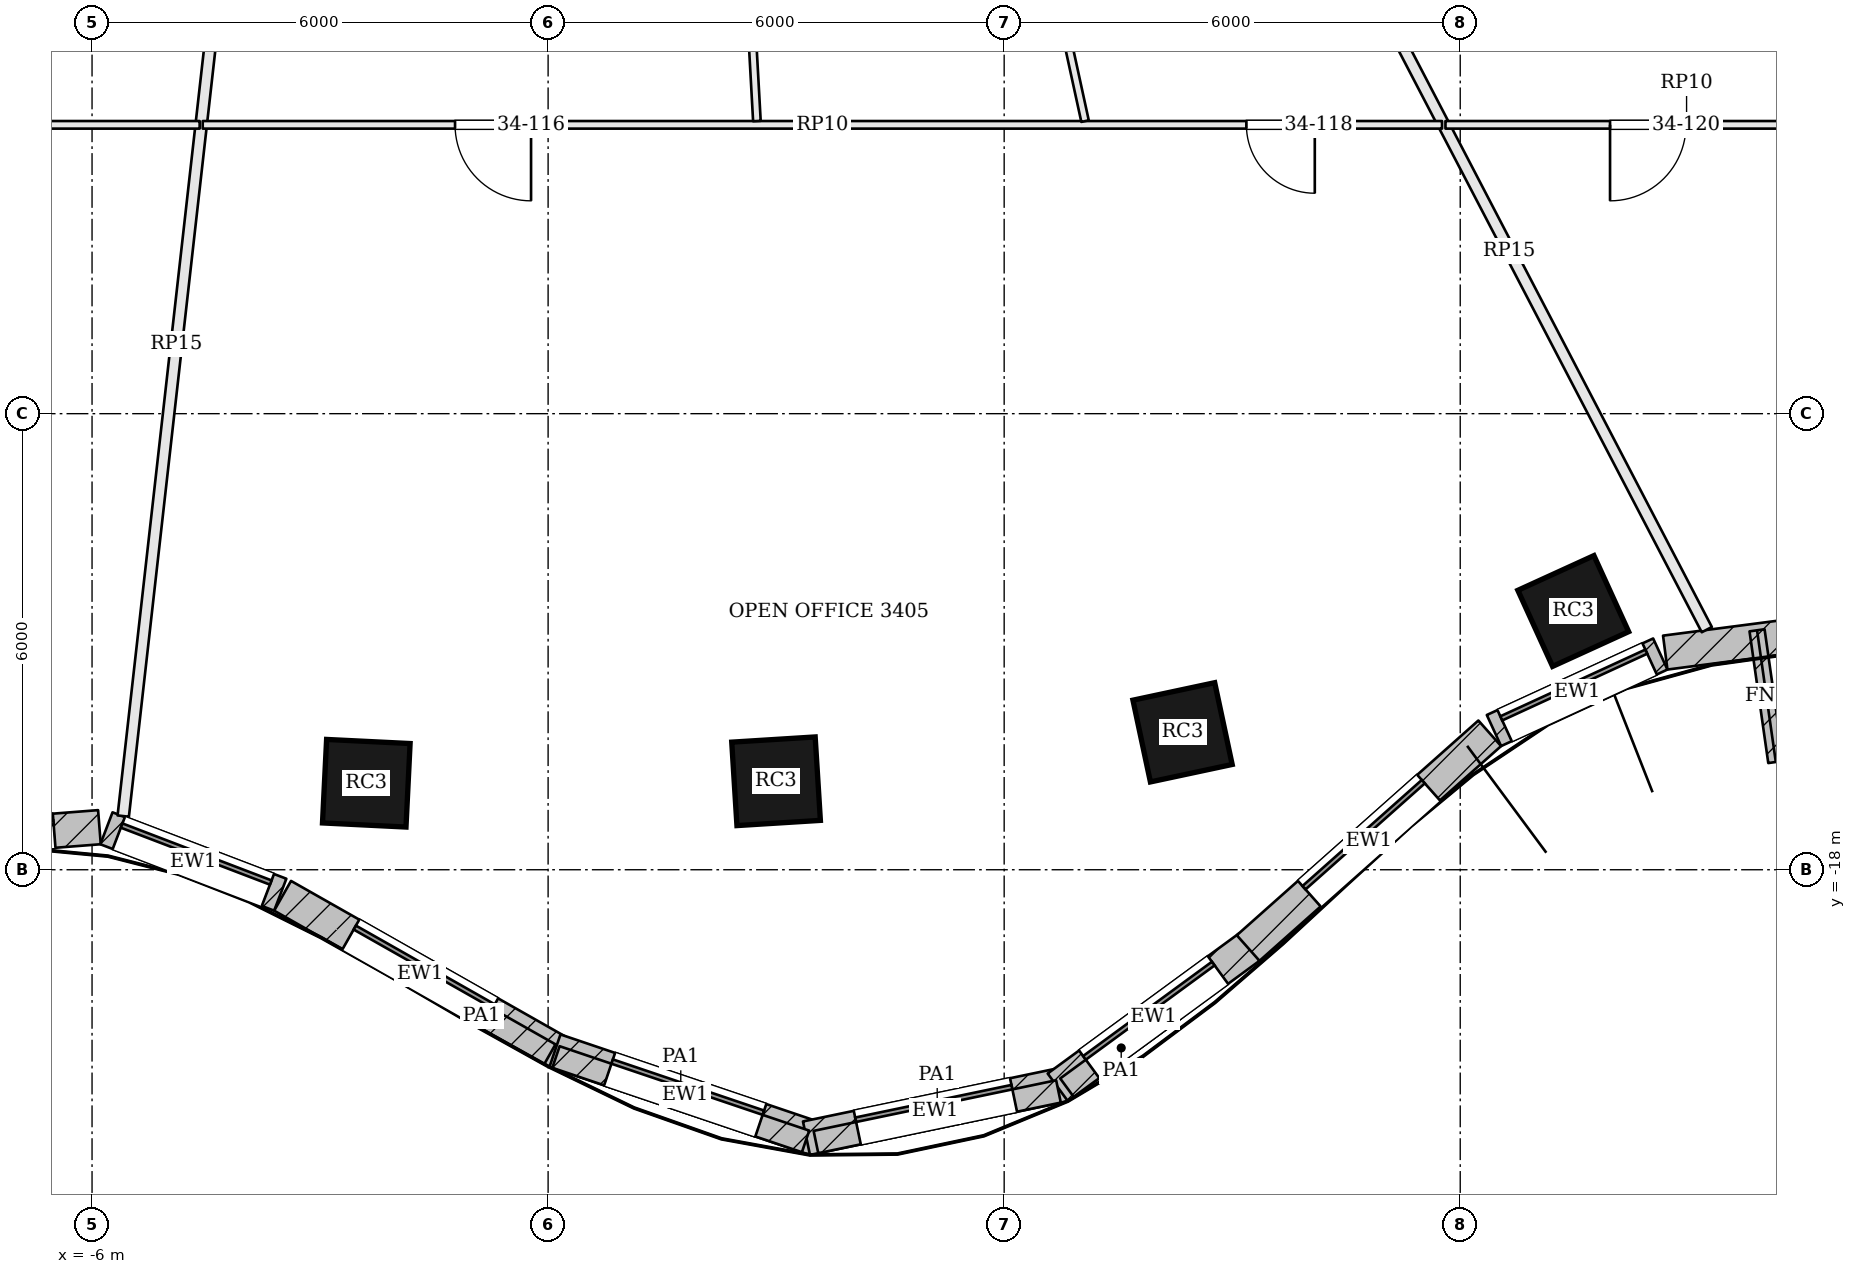
"""IFC4 building model, lengths in metres.
Left out: names, types, materials, properties, quantities, classifications, styles, units other than length and angle.
Written with IfcOpenShell. Run it as: python <this file> out.ifc"""

import sys

from ifc_helpers import new_model, si_unit, direction, frame, frame_2d, origin, origin_2d, place, context, subcontext, project, spatial, rectangle, extrude, element, fill, save


model = new_model("IFC4")
c1 = context("Model", 3, precision=1e-05, world=origin(), true_north=direction((0.0, 1.0)))
c2 = subcontext(c1, "Body", "Model", "MODEL_VIEW")
j1 = project(units=[si_unit("LENGTHUNIT", "METRE"), si_unit("PLANEANGLEUNIT", "RADIAN")], contexts=[c1])
p1 = place(None, origin())
s1 = spatial("IfcSite", under=j1, at=p1, CompositionType="ELEMENT")
p2 = place(p1, origin())
s2 = spatial("IfcBuilding", under=s1, at=p2, CompositionType="ELEMENT")
p3 = place(p2, frame((0.0, 0.0, 142.2)))
s3 = spatial("IfcBuildingStorey", under=s2, at=p3, CompositionType="ELEMENT", Elevation=142.2)
for number, where, z_axis, x_axis in (
    (1, (-2.392, -16.862, 0.0), (0.0, 0.0, 1.0), (0.999, -0.049, 0.0)),
    (2, (2.999, -16.836, 0.0), (0.0, 0.0, 1.0), (0.998, 0.062, 0.0)),
    (3, (8.347, -16.192, 0.0), (0.0, 0.0, 1.0), (0.978, 0.209, 0.0)),
    (4, (13.487, -14.596, 0.0), (0.0, 0.0, 1.0), (0.91, 0.415, 0.0)),
):
    element("IfcColumn", number, at=place(p3, frame(where, z_axis=z_axis, x_axis=x_axis)), inside=s3, PredefinedType="COLUMN", context=c2, shape_type="SweptSolid", body=[
        extrude(rectangle(XDim=1.1, YDim=1.1, at=origin_2d()), origin(), (0.0, 0.0, 1.0), 3.9),
    ])
p4 = place(p3, frame((-9.188, -17.697, 0.0), z_axis=(0.0, 0.0, 1.0), x_axis=(0.996964028691, 0.077863505548, 0.0)))
e5 = element("IfcWall", 5, at=p4, inside=s3, PredefinedType="SOLIDWALL", context=c2, shape_type="SweptSolid", body=[
    extrude(rectangle(XDim=3.295, YDim=0.45, at=frame_2d((1.648, 0.0))), origin(), (0.0, 0.0, 1.0), 3.7),
])
p5 = place(p4, frame((0.598, 0.0, 0.9)))
e6 = element("IfcOpeningElement", 6, at=p5, cuts=e5, PredefinedType="OPENING", context=c2, shape_type="SweptSolid", body=[
    extrude(rectangle(XDim=2.1, YDim=2.3, at=frame_2d((1.05, 1.15))), frame((0.0, 0.235, 0.0), z_axis=(0.0, -1.0, 0.0), x_axis=(1.0, 0.0, 0.0)), (0.0, 0.0, 1.0), 0.47),
])
p6 = place(p3, frame((-5.811, -17.455, 0.0), z_axis=(0.0, 0.0, 1.0), x_axis=(0.934122271306, -0.35695319336, 0.0)))
e7 = element("IfcWall", 7, at=p6, inside=s3, PredefinedType="SOLIDWALL", context=c2, shape_type="SweptSolid", body=[
    extrude(rectangle(XDim=2.448, YDim=0.45, at=frame_2d((1.224, 0.0))), origin(), (0.0, 0.0, 1.0), 3.7),
])
p7 = place(p6, frame((0.174, 0.0, 0.9)))
e8 = element("IfcOpeningElement", 8, at=p7, cuts=e7, PredefinedType="OPENING", context=c2, shape_type="SweptSolid", body=[
    extrude(rectangle(XDim=2.1, YDim=2.3, at=frame_2d((1.05, 1.15))), frame((0.0, 0.235, 0.0), z_axis=(0.0, -1.0, 0.0), x_axis=(1.0, 0.0, 0.0)), (0.0, 0.0, 1.0), 0.47),
])
p8 = place(p3, frame((-3.493, -18.343, 0.0), z_axis=(0.0, 0.0, 1.0), x_axis=(0.869825988853, -0.493358641473, 0.0)))
e9 = element("IfcWall", 9, at=p8, inside=s3, PredefinedType="SOLIDWALL", context=c2, shape_type="SweptSolid", body=[
    extrude(rectangle(XDim=4.165, YDim=0.45, at=frame_2d((2.083, 0.0))), origin(), (0.0, 0.0, 1.0), 3.7),
])
p9 = place(p8, frame((1.032, 0.0, 0.9)))
e10 = element("IfcOpeningElement", 10, at=p9, cuts=e9, PredefinedType="OPENING", context=c2, shape_type="SweptSolid", body=[
    extrude(rectangle(XDim=2.1, YDim=2.3, at=frame_2d((1.05, 1.15))), frame((0.0, 0.235, 0.0), z_axis=(0.0, -1.0, 0.0), x_axis=(1.0, 0.0, 0.0)), (0.0, 0.0, 1.0), 0.47),
])
p10 = place(p3, frame((0.091, -20.38, 0.0), z_axis=(0.0, 0.0, 1.0), x_axis=(0.947304227221, -0.320335294791, 0.0)))
e11 = element("IfcWall", 11, at=p10, inside=s3, PredefinedType="SOLIDWALL", context=c2, shape_type="SweptSolid", body=[
    extrude(rectangle(XDim=3.617, YDim=0.45, at=frame_2d((1.809, 0.0))), origin(), (0.0, 0.0, 1.0), 3.7),
])
p11 = place(p10, frame((0.759, 0.0, 0.9)))
e12 = element("IfcOpeningElement", 12, at=p11, cuts=e11, PredefinedType="OPENING", context=c2, shape_type="SweptSolid", body=[
    extrude(rectangle(XDim=2.1, YDim=2.3, at=frame_2d((1.05, 1.15))), frame((0.0, 0.235, 0.0), z_axis=(0.0, -1.0, 0.0), x_axis=(1.0, 0.0, 0.0)), (0.0, 0.0, 1.0), 0.47),
])
p12 = place(p3, frame((3.399, -21.532, 0.0), z_axis=(0.0, 0.0, 1.0), x_axis=(0.978915912181, 0.204263645512, 0.0)))
e13 = element("IfcWall", 13, at=p12, inside=s3, PredefinedType="SOLIDWALL", context=c2, shape_type="SweptSolid", body=[
    extrude(rectangle(XDim=3.466, YDim=0.45, at=frame_2d((1.733, 0.0))), origin(), (0.0, 0.0, 1.0), 3.7),
])
p13 = place(p12, frame((0.683, 0.0, 0.9)))
e14 = element("IfcOpeningElement", 14, at=p13, cuts=e13, PredefinedType="OPENING", context=c2, shape_type="SweptSolid", body=[
    extrude(rectangle(XDim=2.1, YDim=2.3, at=frame_2d((1.05, 1.15))), frame((0.0, 0.235, 0.0), z_axis=(0.0, -1.0, 0.0), x_axis=(1.0, 0.0, 0.0)), (0.0, 0.0, 1.0), 0.47),
])
p14 = place(p3, frame((6.705, -20.862, 0.0), z_axis=(0.0, 0.0, 1.0), x_axis=(0.806921336267, 0.590658917716, 0.0)))
e15 = element("IfcWall", 15, at=p14, inside=s3, PredefinedType="SOLIDWALL", context=c2, shape_type="SweptSolid", body=[
    extrude(rectangle(XDim=3.125, YDim=0.45, at=frame_2d((1.562, 0.0))), origin(), (0.0, 0.0, 1.0), 3.7),
])
p15 = place(p14, frame((0.512, 0.0, 0.9)))
e16 = element("IfcOpeningElement", 16, at=p15, cuts=e15, PredefinedType="OPENING", context=c2, shape_type="SweptSolid", body=[
    extrude(rectangle(XDim=2.1, YDim=2.3, at=frame_2d((1.05, 1.15))), frame((0.0, 0.235, 0.0), z_axis=(0.0, -1.0, 0.0), x_axis=(1.0, 0.0, 0.0)), (0.0, 0.0, 1.0), 0.47),
])
p16 = place(p3, frame((9.21, -19.03, 0.0), z_axis=(0.0, 0.0, 1.0), x_axis=(0.747396648191, 0.664378092861, 0.0)))
e17 = element("IfcWall", 17, at=p16, inside=s3, PredefinedType="SOLIDWALL", context=c2, shape_type="SweptSolid", body=[
    extrude(rectangle(XDim=4.252, YDim=0.45, at=frame_2d((2.126, 0.0))), origin(), (0.0, 0.0, 1.0), 3.7),
])
p17 = place(p16, frame((1.076, 0.0, 0.9)))
e18 = element("IfcOpeningElement", 18, at=p17, cuts=e17, PredefinedType="OPENING", context=c2, shape_type="SweptSolid", body=[
    extrude(rectangle(XDim=2.1, YDim=2.3, at=frame_2d((1.05, 1.15))), frame((0.0, 0.235, 0.0), z_axis=(0.0, -1.0, 0.0), x_axis=(1.0, 0.0, 0.0)), (0.0, 0.0, 1.0), 0.47),
])
p18 = place(p3, frame((12.444, -16.169, 0.0), z_axis=(0.0, 0.0, 1.0), x_axis=(0.908468904074, 0.417952449844, 0.0)))
e19 = element("IfcWall", 19, at=p18, inside=s3, PredefinedType="SOLIDWALL", context=c2, shape_type="SweptSolid", body=[
    extrude(rectangle(XDim=2.409, YDim=0.45, at=frame_2d((1.205, 0.0))), origin(), (0.0, 0.0, 1.0), 3.7),
])
p19 = place(p18, frame((0.155, 0.0, 0.9)))
e20 = element("IfcOpeningElement", 20, at=p19, cuts=e19, PredefinedType="OPENING", context=c2, shape_type="SweptSolid", body=[
    extrude(rectangle(XDim=2.1, YDim=2.3, at=frame_2d((1.05, 1.15))), frame((0.0, 0.235, 0.0), z_axis=(0.0, -1.0, 0.0), x_axis=(1.0, 0.0, 0.0)), (0.0, 0.0, 1.0), 0.47),
])
p20 = place(p3, frame((14.697, -15.143, 0.0), z_axis=(0.0, 0.0, 1.0), x_axis=(0.991631798411, 0.129098320597, 0.0)))
e21 = element("IfcWall", 21, at=p20, inside=s3, PredefinedType="SOLIDWALL", context=c2, shape_type="SweptSolid", body=[
    extrude(rectangle(XDim=5.547, YDim=0.45, at=frame_2d((2.773, 0.0))), origin(), (0.0, 0.0, 1.0), 3.7),
])
p21 = place(p20, frame((1.723, 0.0, 0.9)))
e22 = element("IfcOpeningElement", 22, at=p21, cuts=e21, PredefinedType="OPENING", context=c2, shape_type="SweptSolid", body=[
    extrude(rectangle(XDim=2.1, YDim=2.3, at=frame_2d((1.05, 1.15))), frame((0.0, 0.235, 0.0), z_axis=(0.0, -1.0, 0.0), x_axis=(1.0, 0.0, 0.0)), (0.0, 0.0, 1.0), 0.47),
])
p22 = place(p3, frame((15.905, -14.85, 0.0), z_axis=(0.0, 0.0, 1.0), x_axis=(0.140913490987, -0.990021912918, 0.0)))
e23 = element("IfcWall", 23, at=p22, inside=s3, PredefinedType="SOLIDWALL", context=c2, shape_type="SweptSolid", body=[
    extrude(rectangle(XDim=1.75, YDim=0.2, at=frame_2d((0.875, 0.0))), origin(), (0.0, 0.0, 1.0), 3.7),
])
p23 = place(p3, frame((-1.774, -19.409, 3.9), z_axis=(0.0, 0.0, 1.0), x_axis=(0.869875110904, -0.493272025792, 0.0)))
e24 = element("IfcWall", 24, at=p23, inside=s3, PredefinedType="PARAPET", context=c2, shape_type="SweptSolid", body=[
    extrude(rectangle(XDim=2.065, YDim=0.3, at=frame_2d((1.033, 0.0))), origin(), (0.0, 0.0, 1.0), 1.1),
])
p24 = place(p3, frame((0.104, -20.464, 3.9), z_axis=(0.0, 0.0, 1.0), x_axis=(0.947286690835, -0.32038714919, 0.0)))
e25 = element("IfcWall", 25, at=p24, inside=s3, PredefinedType="PARAPET", context=c2, shape_type="SweptSolid", body=[
    extrude(rectangle(XDim=3.466, YDim=0.3, at=frame_2d((1.733, 0.0))), origin(), (0.0, 0.0, 1.0), 1.1),
])
p25 = place(p3, frame((3.524, -21.582, 3.9), z_axis=(0.0, 0.0, 1.0), x_axis=(0.97891618591, 0.204262333689, 0.0)))
e26 = element("IfcWall", 26, at=p25, inside=s3, PredefinedType="PARAPET", context=c2, shape_type="SweptSolid", body=[
    extrude(rectangle(XDim=3.259, YDim=0.3, at=frame_2d((1.63, 0.0))), origin(), (0.0, 0.0, 1.0), 1.1),
])
p26 = place(p3, frame((6.826, -20.867, 3.9), z_axis=(0.0, 0.0, 1.0), x_axis=(0.806882780815, 0.59071158616, 0.0)))
e27 = element("IfcWall", 27, at=p26, inside=s3, PredefinedType="PARAPET", context=c2, shape_type="SweptSolid", body=[
    extrude(rectangle(XDim=1.77, YDim=0.3, at=frame_2d((0.885, 0.0))), origin(), (0.0, 0.0, 1.0), 1.1),
])
p27 = place(p3, frame((-5.59, -17.294, 0.0), z_axis=(0.0, 0.0, 1.0), x_axis=(0.112047950982, 0.993702800983, 0.0)))
e28 = element("IfcWall", 28, at=p27, inside=s3, PredefinedType="PARTITIONING", context=c2, shape_type="SweptSolid", body=[
    extrude(rectangle(XDim=12.498, YDim=0.15, at=frame_2d((6.249, 0.0))), origin(), (0.0, 0.0, 1.0), 3.198),
])
p28 = place(p3, frame((15.244, -14.841, 0.0), z_axis=(0.0, 0.0, 1.0), x_axis=(-0.46213645011, 0.88680883029, 0.0)))
e29 = element("IfcWall", 29, at=p28, inside=s3, PredefinedType="PARTITIONING", context=c2, shape_type="SweptSolid", body=[
    extrude(rectangle(XDim=11.248, YDim=0.15, at=frame_2d((5.624, 0.0))), origin(), (0.0, 0.0, 1.0), 3.198),
])
p29 = place(p3, frame((-4.584, -8.2, 0.0), z_axis=(0.0, 0.0, 1.0), x_axis=(-1.0, 0.0, 0.0)))
e30 = element("IfcWall", 30, at=p29, inside=s3, PredefinedType="PARTITIONING", context=c2, shape_type="SweptSolid", body=[
    extrude(rectangle(XDim=13.566, YDim=0.1, at=frame_2d((6.783, 0.0))), origin(), (0.0, 0.0, 1.0), 3.184),
])
p30 = place(p3, frame((-6.453, -4.873, 0.0), z_axis=(0.0, 0.0, 1.0), x_axis=(-0.21917670953, -0.975685179758, 0.0)))
e31 = element("IfcWall", 31, at=p30, inside=s3, PredefinedType="PARTITIONING", context=c2, shape_type="SweptSolid", body=[
    extrude(rectangle(XDim=3.36, YDim=0.1, at=frame_2d((1.68, 0.0))), origin(), (0.0, 0.0, 1.0), 3.184),
])
p31 = place(p3, frame((11.76, -8.2, 0.0), z_axis=(0.0, 0.0, 1.0), x_axis=(-1.0, 0.0, 0.0)))
e32 = element("IfcWall", 32, at=p31, inside=s3, PredefinedType="PARTITIONING", context=c2, shape_type="SweptSolid", body=[
    extrude(rectangle(XDim=16.305, YDim=0.1, at=frame_2d((8.152, 0.0))), origin(), (0.0, 0.0, 1.0), 3.184),
])
p32 = place(p31, frame((11.985, 0.0, 0.0)))
e33 = element("IfcOpeningElement", 33, at=p32, cuts=e32, PredefinedType="OPENING", context=c2, shape_type="SweptSolid", body=[
    extrude(rectangle(XDim=1.0, YDim=2.1, at=frame_2d((0.5, 1.05))), frame((0.0, 0.06, 0.0), z_axis=(0.0, -1.0, 0.0), x_axis=(1.0, 0.0, 0.0)), (0.0, 0.0, 1.0), 0.12),
])
p33 = place(p31, frame((1.674, 0.0, 0.0)))
e34 = element("IfcOpeningElement", 34, at=p33, cuts=e32, PredefinedType="OPENING", context=c2, shape_type="SweptSolid", body=[
    extrude(rectangle(XDim=0.9, YDim=2.1, at=frame_2d((0.45, 1.05))), frame((0.0, 0.06, 0.0), z_axis=(0.0, -1.0, 0.0), x_axis=(1.0, 0.0, 0.0)), (0.0, 0.0, 1.0), 0.12),
])
p34 = place(p3, frame((2.566, -4.875, 0.0), z_axis=(0.0, 0.0, 1.0), x_axis=(0.05515260166, -0.998477936927, 0.0)))
e35 = element("IfcWall", 35, at=p34, inside=s3, PredefinedType="PARTITIONING", context=c2, shape_type="SweptSolid", body=[
    extrude(rectangle(XDim=3.28, YDim=0.1, at=frame_2d((1.64, 0.0))), origin(), (0.0, 0.0, 1.0), 3.184),
])
p35 = place(p3, frame((6.35, -4.873, 0.0), z_axis=(0.0, 0.0, 1.0), x_axis=(0.213006668545, -0.977050745435, 0.0)))
e36 = element("IfcWall", 36, at=p35, inside=s3, PredefinedType="PARTITIONING", context=c2, shape_type="SweptSolid", body=[
    extrude(rectangle(XDim=3.355, YDim=0.1, at=frame_2d((1.677, 0.0))), origin(), (0.0, 0.0, 1.0), 3.184),
])
p36 = place(p3, frame((18.15, -8.2, 0.0), z_axis=(0.0, 0.0, 1.0), x_axis=(-1.0, 0.0, 0.0)))
e37 = element("IfcWall", 37, at=p36, inside=s3, PredefinedType="PARTITIONING", context=c2, shape_type="SweptSolid", body=[
    extrude(rectangle(XDim=6.344, YDim=0.1, at=frame_2d((3.172, 0.0))), origin(), (0.0, 0.0, 1.0), 3.184),
])
p37 = place(p36, frame((3.179, 0.0, 0.0)))
e38 = element("IfcOpeningElement", 38, at=p37, cuts=e37, PredefinedType="OPENING", context=c2, shape_type="SweptSolid", body=[
    extrude(rectangle(XDim=1.0, YDim=2.1, at=frame_2d((0.5, 1.05))), frame((0.0, 0.06, 0.0), z_axis=(0.0, -1.0, 0.0), x_axis=(1.0, 0.0, 0.0)), (0.0, 0.0, 1.0), 0.12),
])
p38 = place(p3, frame((13.896, -4.844, 0.0), z_axis=(0.0, 0.0, 1.0), x_axis=(0.810468668719, -0.585781987624, 0.0)))
e39 = element("IfcWall", 39, at=p38, inside=s3, PredefinedType="PARTITIONING", context=c2, shape_type="SweptSolid", body=[
    extrude(rectangle(XDim=5.26, YDim=0.1, at=frame_2d((2.63, 0.0))), origin(), (0.0, 0.0, 1.0), 3.184),
])
p39 = place(p5, origin())
e40 = element("IfcWindow", 40, at=p39, inside=s3, PartitioningType="SINGLE_PANEL", PredefinedType="WINDOW", context=c2, shape_type="SweptSolid", body=[
    extrude(rectangle(XDim=2.1, YDim=2.3, at=frame_2d((1.05, 1.15))), frame((0.0, 0.135, 0.0), z_axis=(0.0, -1.0, 0.0), x_axis=(1.0, 0.0, 0.0)), (0.0, 0.0, 1.0), 0.06),
])
fill(e6, e40)
p40 = place(p7, origin())
e41 = element("IfcWindow", 41, at=p40, inside=s3, PartitioningType="SINGLE_PANEL", PredefinedType="WINDOW", context=c2, shape_type="SweptSolid", body=[
    extrude(rectangle(XDim=2.1, YDim=2.3, at=frame_2d((1.05, 1.15))), frame((0.0, 0.135, 0.0), z_axis=(0.0, -1.0, 0.0), x_axis=(1.0, 0.0, 0.0)), (0.0, 0.0, 1.0), 0.06),
])
fill(e8, e41)
p41 = place(p9, origin())
e42 = element("IfcWindow", 42, at=p41, inside=s3, PartitioningType="SINGLE_PANEL", PredefinedType="WINDOW", context=c2, shape_type="SweptSolid", body=[
    extrude(rectangle(XDim=2.1, YDim=2.3, at=frame_2d((1.05, 1.15))), frame((0.0, 0.135, 0.0), z_axis=(0.0, -1.0, 0.0), x_axis=(1.0, 0.0, 0.0)), (0.0, 0.0, 1.0), 0.06),
])
fill(e10, e42)
p42 = place(p11, origin())
e43 = element("IfcWindow", 43, at=p42, inside=s3, PartitioningType="SINGLE_PANEL", PredefinedType="WINDOW", context=c2, shape_type="SweptSolid", body=[
    extrude(rectangle(XDim=2.1, YDim=2.3, at=frame_2d((1.05, 1.15))), frame((0.0, 0.135, 0.0), z_axis=(0.0, -1.0, 0.0), x_axis=(1.0, 0.0, 0.0)), (0.0, 0.0, 1.0), 0.06),
])
fill(e12, e43)
p43 = place(p13, origin())
e44 = element("IfcWindow", 44, at=p43, inside=s3, PartitioningType="SINGLE_PANEL", PredefinedType="WINDOW", context=c2, shape_type="SweptSolid", body=[
    extrude(rectangle(XDim=2.1, YDim=2.3, at=frame_2d((1.05, 1.15))), frame((0.0, 0.135, 0.0), z_axis=(0.0, -1.0, 0.0), x_axis=(1.0, 0.0, 0.0)), (0.0, 0.0, 1.0), 0.06),
])
fill(e14, e44)
p44 = place(p15, origin())
e45 = element("IfcWindow", 45, at=p44, inside=s3, PartitioningType="SINGLE_PANEL", PredefinedType="WINDOW", context=c2, shape_type="SweptSolid", body=[
    extrude(rectangle(XDim=2.1, YDim=2.3, at=frame_2d((1.05, 1.15))), frame((0.0, 0.135, 0.0), z_axis=(0.0, -1.0, 0.0), x_axis=(1.0, 0.0, 0.0)), (0.0, 0.0, 1.0), 0.06),
])
fill(e16, e45)
p45 = place(p17, origin())
e46 = element("IfcWindow", 46, at=p45, inside=s3, PartitioningType="SINGLE_PANEL", PredefinedType="WINDOW", context=c2, shape_type="SweptSolid", body=[
    extrude(rectangle(XDim=2.1, YDim=2.3, at=frame_2d((1.05, 1.15))), frame((0.0, 0.135, 0.0), z_axis=(0.0, -1.0, 0.0), x_axis=(1.0, 0.0, 0.0)), (0.0, 0.0, 1.0), 0.06),
])
fill(e18, e46)
p46 = place(p19, origin())
e47 = element("IfcWindow", 47, at=p46, inside=s3, PartitioningType="SINGLE_PANEL", PredefinedType="WINDOW", context=c2, shape_type="SweptSolid", body=[
    extrude(rectangle(XDim=2.1, YDim=2.3, at=frame_2d((1.05, 1.15))), frame((0.0, 0.135, 0.0), z_axis=(0.0, -1.0, 0.0), x_axis=(1.0, 0.0, 0.0)), (0.0, 0.0, 1.0), 0.06),
])
fill(e20, e47)
p47 = place(p32, origin())
e48 = element("IfcDoor", 48, at=p47, inside=s3, OperationType="SINGLE_SWING_LEFT", PredefinedType="DOOR", context=c2, shape_type="SweptSolid", body=[
    extrude(rectangle(XDim=1.0, YDim=2.1, at=frame_2d((0.5, 1.05))), frame((0.0, 0.025, 0.0), z_axis=(0.0, -1.0, 0.0), x_axis=(1.0, 0.0, 0.0)), (0.0, 0.0, 1.0), 0.05),
])
fill(e33, e48)
p48 = place(p33, origin())
e49 = element("IfcDoor", 49, at=p48, inside=s3, OperationType="SINGLE_SWING_LEFT", PredefinedType="DOOR", context=c2, shape_type="SweptSolid", body=[
    extrude(rectangle(XDim=0.9, YDim=2.1, at=frame_2d((0.45, 1.05))), frame((0.0, 0.025, 0.0), z_axis=(0.0, -1.0, 0.0), x_axis=(1.0, 0.0, 0.0)), (0.0, 0.0, 1.0), 0.05),
])
fill(e34, e49)
p49 = place(p37, origin())
e50 = element("IfcDoor", 50, at=p49, inside=s3, OperationType="SINGLE_SWING_RIGHT", PredefinedType="DOOR", context=c2, shape_type="SweptSolid", body=[
    extrude(rectangle(XDim=1.0, YDim=2.1, at=frame_2d((0.5, 1.05))), frame((0.0, 0.025, 0.0), z_axis=(0.0, -1.0, 0.0), x_axis=(1.0, 0.0, 0.0)), (0.0, 0.0, 1.0), 0.05),
])
fill(e38, e50)
save(model, sys.argv[1])
